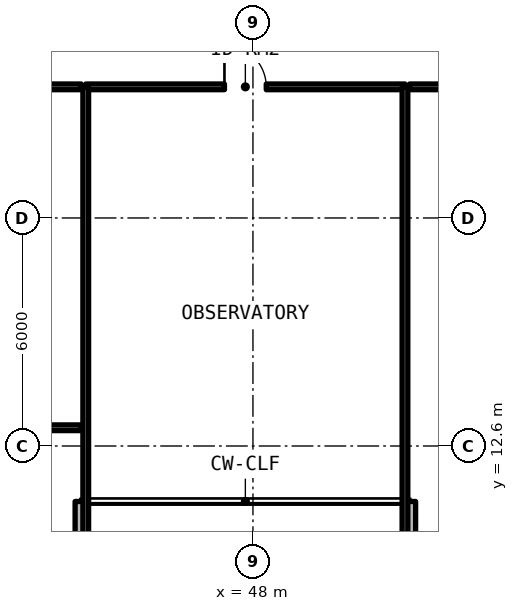
"""IFC4 building model, lengths in metres.
Left out: names, types, materials, properties, quantities, classifications, styles, units other than length and angle.
Written with IfcOpenShell. Run it as: python <this file> out.ifc"""

import sys

from ifc_helpers import new_model, si_unit, direction, frame, frame_2d, origin, place, context, subcontext, project, spatial, rectangle, extrude, element, fill, save


model = new_model("IFC4")
c1 = context("Model", 3, precision=1e-05, world=origin(), true_north=direction((0.0, 1.0)))
c2 = subcontext(c1, "Body", "Model", "MODEL_VIEW")
j1 = project(units=[si_unit("LENGTHUNIT", "METRE"), si_unit("PLANEANGLEUNIT", "RADIAN")], contexts=[c1])
p1 = place(None, origin())
s1 = spatial("IfcSite", under=j1, at=p1, CompositionType="ELEMENT")
p2 = place(p1, origin())
s2 = spatial("IfcBuilding", under=s1, at=p2, CompositionType="ELEMENT")
p3 = place(p2, frame((0.0, 0.0, 52.14)))
s3 = spatial("IfcBuildingStorey", under=s2, at=p3, CompositionType="ELEMENT", Elevation=52.14)
for number, where, z_axis, x_axis in (
    (1, (43.46, 7.74, 0.0), (0.0, 0.0, 1.0), (0.0, 1.0, 0.0)),
    (2, (52.14, 11.14, 0.0), (0.0, 0.0, 1.0), (0.0, -1.0, 0.0)),
):
    element("IfcWall", number, at=place(p3, frame(where, z_axis=z_axis, x_axis=x_axis)), inside=s3, PredefinedType="SOLIDWALL", context=c2, shape_type="SweptSolid", body=[
        extrude(rectangle(XDim=3.4, YDim=0.28, at=frame_2d((1.7, 0.0))), origin(), (0.0, 0.0, 1.0), 3.08),
    ])
p4 = place(p3, frame((43.6, 22.05, 0.0), z_axis=(0.0, 0.0, 1.0), x_axis=(1.0, 0.0, 0.0)))
e3 = element("IfcWall", 3, at=p4, inside=s3, PredefinedType="SOLIDWALL", context=c2, shape_type="SweptSolid", body=[
    extrude(rectangle(XDim=8.4, YDim=0.15, at=frame_2d((4.2, 0.0))), origin(), (0.0, 0.0, 1.0), 2.35),
])
p5 = place(p4, frame((3.65, 0.0, 0.0)))
e4 = element("IfcOpeningElement", 4, at=p5, cuts=e3, PredefinedType="OPENING", context=c2, shape_type="SweptSolid", body=[
    extrude(rectangle(XDim=1.1, YDim=2.15, at=frame_2d((0.55, 1.075))), frame((0.0, 0.085, 0.0), z_axis=(0.0, -1.0, 0.0), x_axis=(1.0, 0.0, 0.0)), (0.0, 0.0, 1.0), 0.17),
])
for number, where, z_axis, x_axis in (
    (5, (43.6, 7.88, 0.0), (0.0, 0.0, 1.0), (0.0, 1.0, 0.0)),
    (6, (52.0, 7.88, 0.0), (0.0, 0.0, 1.0), (0.0, 1.0, 0.0)),
):
    element("IfcWall", number, at=place(p3, frame(where, z_axis=z_axis, x_axis=x_axis)), inside=s3, PredefinedType="SOLIDWALL", context=c2, shape_type="SweptSolid", body=[
        extrude(rectangle(XDim=14.17, YDim=0.15, at=frame_2d((7.085, 0.0))), origin(), (0.0, 0.0, 1.0), 2.35),
    ])
p6 = place(p3, frame((35.82, 13.08, 0.0), z_axis=(0.0, 0.0, 1.0), x_axis=(1.0, 0.0, 0.0)))
e7 = element("IfcWall", 7, at=p6, inside=s3, PredefinedType="PARTITIONING", context=c2, shape_type="SweptSolid", body=[
    extrude(rectangle(XDim=7.66, YDim=0.15, at=frame_2d((3.83, 0.0))), origin(), (0.0, 0.0, 1.0), 2.35),
])
p7 = place(p6, frame((2.875, 0.0, 0.0)))
e8 = element("IfcOpeningElement", 8, at=p7, cuts=e7, PredefinedType="OPENING", context=c2, shape_type="SweptSolid", body=[
    extrude(rectangle(XDim=0.85, YDim=2.1, at=frame_2d((0.425, 1.05))), frame((0.0, 0.085, 0.0), z_axis=(0.0, -1.0, 0.0), x_axis=(1.0, 0.0, 0.0)), (0.0, 0.0, 1.0), 0.17),
])
p8 = place(p6, frame((5.53, 0.0, 0.0)))
e9 = element("IfcOpeningElement", 9, at=p8, cuts=e7, PredefinedType="OPENING", context=c2, shape_type="SweptSolid", body=[
    extrude(rectangle(XDim=0.85, YDim=2.1, at=frame_2d((0.425, 1.05))), frame((0.0, 0.085, 0.0), z_axis=(0.0, -1.0, 0.0), x_axis=(1.0, 0.0, 0.0)), (0.0, 0.0, 1.0), 0.17),
])
p9 = place(p3, frame((35.82, 22.05, 0.0), z_axis=(0.0, 0.0, 1.0), x_axis=(1.0, 0.0, 0.0)))
e10 = element("IfcWall", 10, at=p9, inside=s3, PredefinedType="SOLIDWALL", context=c2, shape_type="SweptSolid", body=[
    extrude(rectangle(XDim=7.66, YDim=0.15, at=frame_2d((3.83, 0.0))), origin(), (0.0, 0.0, 1.0), 2.35),
])
p10 = place(p9, frame((4.57, 0.0, 0.0)))
e11 = element("IfcOpeningElement", 11, at=p10, cuts=e10, PredefinedType="OPENING", context=c2, shape_type="SweptSolid", body=[
    extrude(rectangle(XDim=0.95, YDim=2.15, at=frame_2d((0.475, 1.075))), frame((0.0, 0.085, 0.0), z_axis=(0.0, -1.0, 0.0), x_axis=(1.0, 0.0, 0.0)), (0.0, 0.0, 1.0), 0.17),
])
p11 = place(p3, frame((52.12, 22.05, 0.0), z_axis=(0.0, 0.0, 1.0), x_axis=(1.0, 0.0, 0.0)))
e12 = element("IfcWall", 12, at=p11, inside=s3, PredefinedType="SOLIDWALL", context=c2, shape_type="SweptSolid", body=[
    extrude(rectangle(XDim=6.98, YDim=0.15, at=frame_2d((3.49, 0.0))), origin(), (0.0, 0.0, 1.0), 2.35),
])
p12 = place(p11, frame((3.015, 0.0, 0.0)))
e13 = element("IfcOpeningElement", 13, at=p12, cuts=e12, PredefinedType="OPENING", context=c2, shape_type="SweptSolid", body=[
    extrude(rectangle(XDim=0.95, YDim=2.15, at=frame_2d((0.475, 1.075))), frame((0.0, 0.085, 0.0), z_axis=(0.0, -1.0, 0.0), x_axis=(1.0, 0.0, 0.0)), (0.0, 0.0, 1.0), 0.17),
])
p13 = place(p5, origin())
e14 = element("IfcDoor", 14, at=p13, inside=s3, OperationType="SINGLE_SWING_LEFT", PredefinedType="DOOR", context=c2, shape_type="SweptSolid", body=[
    extrude(rectangle(XDim=1.1, YDim=2.15, at=frame_2d((0.55, 1.075))), frame((0.0, 0.025, 0.0), z_axis=(0.0, -1.0, 0.0), x_axis=(1.0, 0.0, 0.0)), (0.0, 0.0, 1.0), 0.05),
])
fill(e4, e14)
save(model, sys.argv[1])
